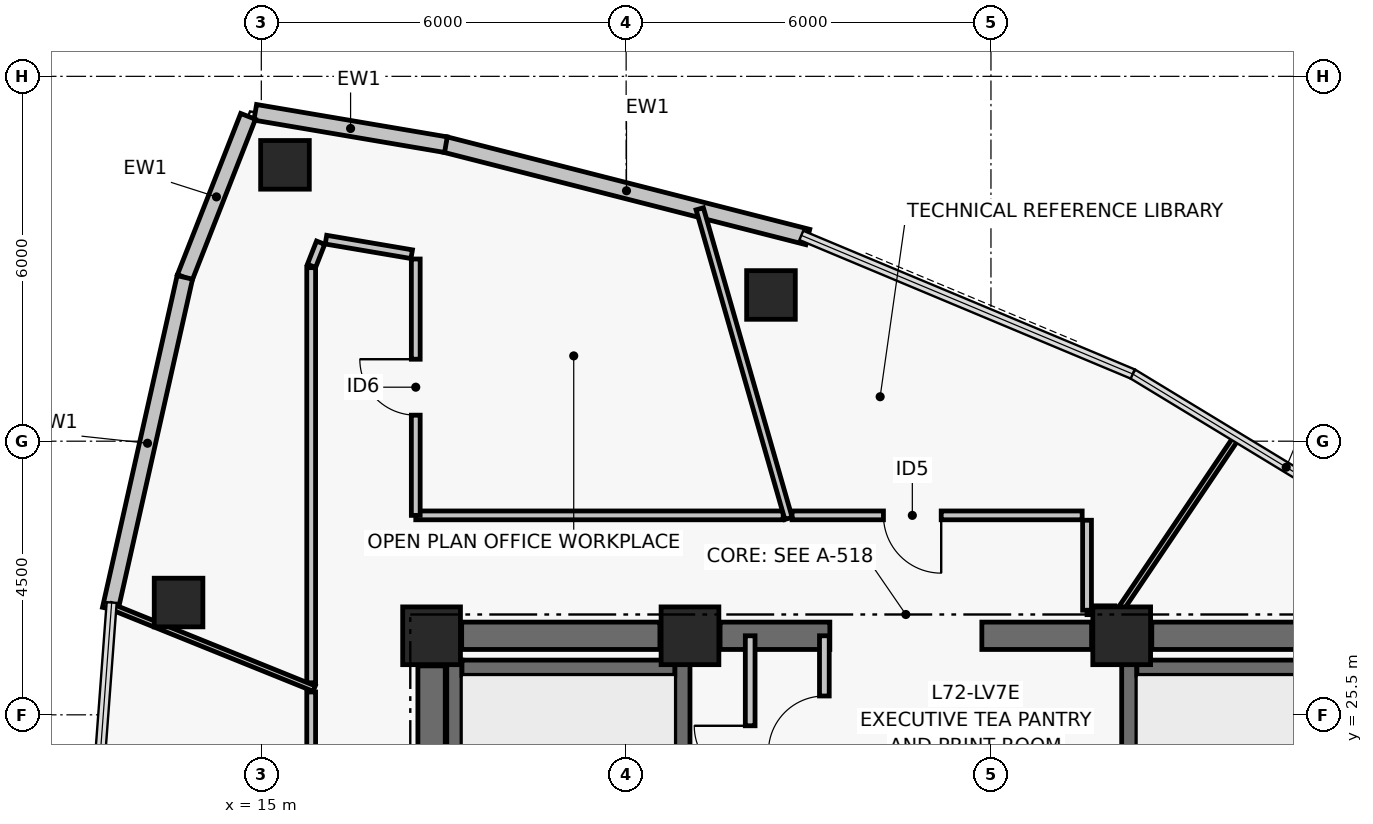
"""IFC4 building model, lengths in metres.
Left out: names, types, materials, properties, quantities, classifications, styles, units other than length and angle.
Written with IfcOpenShell. Run it as: python <this file> out.ifc"""

import sys

from ifc_helpers import new_model, si_unit, direction, frame, frame_2d, origin, origin_2d, place, context, subcontext, project, spatial, rectangle, hollow_rectangle, extrude, element, fill, save


model = new_model("IFC4")
c1 = context("Model", 3, precision=1e-05, world=origin(), true_north=direction((0.0, 1.0)))
c2 = subcontext(c1, "Body", "Model", "MODEL_VIEW")
j1 = project(units=[si_unit("LENGTHUNIT", "METRE"), si_unit("PLANEANGLEUNIT", "RADIAN")], contexts=[c1])
p1 = place(None, origin())
s1 = spatial("IfcSite", under=j1, at=p1, CompositionType="ELEMENT")
p2 = place(p1, origin())
s2 = spatial("IfcBuilding", under=s1, at=p2, CompositionType="ELEMENT")
p3 = place(p2, frame((0.0, 0.0, 284.34)))
s3 = spatial("IfcBuildingStorey", under=s2, at=p3, CompositionType="ELEMENT", Elevation=284.34)
for number, where, z_axis, x_axis in (
    (1, (17.8, 26.8, 0.0), (0.0, 0.0, 1.0), (1.0, 0.0, 0.0)),
    (2, (22.05, 26.8, 0.0), (0.0, 0.0, 1.0), (1.0, 0.0, 0.0)),
    (3, (29.15, 26.8, 0.0), (0.0, 0.0, 1.0), (1.0, 0.0, 0.0)),
):
    element("IfcColumn", number, at=place(p3, frame(where, z_axis=z_axis, x_axis=x_axis)), inside=s3, PredefinedType="COLUMN", context=c2, shape_type="SweptSolid", body=[
        extrude(rectangle(XDim=0.95, YDim=0.95, at=origin_2d()), origin(), (0.0, 0.0, 1.0), 3.72),
    ])
p4 = place(p3, frame((18.295, 26.8, 0.0), z_axis=(0.0, 0.0, 1.0), x_axis=(1.0, 0.0, 0.0)))
e4 = element("IfcWall", 4, at=p4, inside=s3, PredefinedType="SHEAR", context=c2, shape_type="SweptSolid", body=[
    extrude(rectangle(XDim=3.26, YDim=0.45, at=frame_2d((1.63, 0.0))), origin(), (0.0, 0.0, 1.0), 3.5),
])
p5 = place(p3, frame((22.545, 26.8, 0.0), z_axis=(0.0, 0.0, 1.0), x_axis=(1.0, 0.0, 0.0)))
e5 = element("IfcWall", 5, at=p5, inside=s3, PredefinedType="SHEAR", context=c2, shape_type="SweptSolid", body=[
    extrude(rectangle(XDim=1.805, YDim=0.45, at=frame_2d((0.903, 0.0))), origin(), (0.0, 0.0, 1.0), 3.5),
])
p6 = place(p3, frame((26.85, 26.8, 0.0), z_axis=(0.0, 0.0, 1.0), x_axis=(1.0, 0.0, 0.0)))
e6 = element("IfcWall", 6, at=p6, inside=s3, PredefinedType="SHEAR", context=c2, shape_type="SweptSolid", body=[
    extrude(rectangle(XDim=1.805, YDim=0.45, at=frame_2d((0.902, 0.0))), origin(), (0.0, 0.0, 1.0), 3.5),
])
p7 = place(p3, frame((29.645, 26.8, 0.0), z_axis=(0.0, 0.0, 1.0), x_axis=(1.0, 0.0, 0.0)))
e7 = element("IfcWall", 7, at=p7, inside=s3, PredefinedType="SHEAR", context=c2, shape_type="SweptSolid", body=[
    extrude(rectangle(XDim=3.26, YDim=0.45, at=frame_2d((1.63, 0.0))), origin(), (0.0, 0.0, 1.0), 3.5),
])
p8 = place(p3, frame((17.8, 17.695, 0.0), z_axis=(0.0, 0.0, 1.0), x_axis=(0.0, 1.0, 0.0)))
e8 = element("IfcWall", 8, at=p8, inside=s3, PredefinedType="SHEAR", context=c2, shape_type="SweptSolid", body=[
    extrude(rectangle(XDim=8.61, YDim=0.45, at=frame_2d((4.305, 0.0))), origin(), (0.0, 0.0, 1.0), 3.5),
])
p9 = place(p3, frame((18.175, 17.6, 0.0), z_axis=(0.0, 0.0, 1.0), x_axis=(0.0, 1.0, 0.0)))
e9 = element("IfcWall", 9, at=p9, inside=s3, PredefinedType="SHEAR", context=c2, shape_type="SweptSolid", body=[
    extrude(rectangle(XDim=8.8, YDim=0.25, at=frame_2d((4.4, 0.0))), origin(), (0.0, 0.0, 1.0), 3.5),
])
p10 = place(p3, frame((21.925, 17.6, 0.0), z_axis=(0.0, 0.0, 1.0), x_axis=(0.0, 1.0, 0.0)))
e10 = element("IfcWall", 10, at=p10, inside=s3, PredefinedType="SHEAR", context=c2, shape_type="SweptSolid", body=[
    extrude(rectangle(XDim=8.8, YDim=0.25, at=frame_2d((4.4, 0.0))), origin(), (0.0, 0.0, 1.0), 3.5),
])
p11 = place(p10, frame((0.35, 0.0, 0.0)))
e11 = element("IfcOpeningElement", 11, at=p11, cuts=e10, PredefinedType="OPENING", context=c2, shape_type="SweptSolid", body=[
    extrude(rectangle(XDim=1.05, YDim=2.08, at=frame_2d((0.525, 1.04))), frame((0.0, 0.135, 0.0), z_axis=(0.0, -1.0, 0.0), x_axis=(1.0, 0.0, 0.0)), (0.0, 0.0, 1.0), 0.27),
])
p12 = place(p3, frame((18.3, 26.275, 0.0), z_axis=(0.0, 0.0, 1.0), x_axis=(1.0, 0.0, 0.0)))
e12 = element("IfcWall", 12, at=p12, inside=s3, PredefinedType="SHEAR", context=c2, shape_type="SweptSolid", body=[
    extrude(rectangle(XDim=3.5, YDim=0.25, at=frame_2d((1.75, 0.0))), origin(), (0.0, 0.0, 1.0), 3.5),
])
p13 = place(p3, frame((29.275, 17.6, 0.0), z_axis=(0.0, 0.0, 1.0), x_axis=(0.0, 1.0, 0.0)))
e13 = element("IfcWall", 13, at=p13, inside=s3, PredefinedType="SHEAR", context=c2, shape_type="SweptSolid", body=[
    extrude(rectangle(XDim=8.8, YDim=0.25, at=frame_2d((4.4, 0.0))), origin(), (0.0, 0.0, 1.0), 3.5),
])
p14 = place(p13, frame((0.35, 0.0, 0.0)))
e14 = element("IfcOpeningElement", 14, at=p14, cuts=e13, PredefinedType="OPENING", context=c2, shape_type="SweptSolid", body=[
    extrude(rectangle(XDim=1.05, YDim=2.08, at=frame_2d((0.525, 1.04))), frame((0.0, 0.135, 0.0), z_axis=(0.0, -1.0, 0.0), x_axis=(1.0, 0.0, 0.0)), (0.0, 0.0, 1.0), 0.27),
])
p15 = place(p3, frame((29.4, 26.275, 0.0), z_axis=(0.0, 0.0, 1.0), x_axis=(1.0, 0.0, 0.0)))
e15 = element("IfcWall", 15, at=p15, inside=s3, PredefinedType="SHEAR", context=c2, shape_type="SweptSolid", body=[
    extrude(rectangle(XDim=3.5, YDim=0.25, at=frame_2d((1.75, 0.0))), origin(), (0.0, 0.0, 1.0), 3.5),
])
for number, where, z_axis, x_axis in (
    (16, (23.382, 32.405, 0.0), (0.0, 0.0, 1.0), (1.0, 0.0, 0.0)),
    (17, (15.389, 34.545, 0.0), (0.0, 0.0, 1.0), (1.0, 0.0, 0.0)),
    (18, (13.639, 27.347, 0.0), (0.0, 0.0, 1.0), (1.0, 0.0, 0.0)),
):
    element("IfcColumn", number, at=place(p3, frame(where, z_axis=z_axis, x_axis=x_axis)), inside=s3, PredefinedType="COLUMN", context=c2, shape_type="SweptSolid", body=[
        extrude(hollow_rectangle(XDim=0.8, YDim=0.8, WallThickness=0.035, at=origin_2d()), origin(), (0.0, 0.0, 1.0), 3.72),
    ])
p16 = place(p3, frame((18.024, 34.879, 0.0), z_axis=(0.0, 0.0, 1.0), x_axis=(0.968988278672, -0.247106689096, 0.0)))
e19 = element("IfcWall", 19, at=p16, inside=s3, PredefinedType="PARTITIONING", context=c2, shape_type="SweptSolid", body=[
    extrude(rectangle(XDim=6.154, YDim=0.26, at=frame_2d((3.077, 0.0))), origin(), (0.0, 0.0, 1.0), 3.5),
])
p17 = place(p3, frame((14.9, 35.409, 0.0), z_axis=(0.0, 0.0, 1.0), x_axis=(0.985889432766, -0.167397808709, 0.0)))
e20 = element("IfcWall", 20, at=p17, inside=s3, PredefinedType="PARTITIONING", context=c2, shape_type="SweptSolid", body=[
    extrude(rectangle(XDim=3.181, YDim=0.26, at=frame_2d((1.59, 0.0))), origin(), (0.0, 0.0, 1.0), 3.5),
])
p18 = place(p3, frame((13.742, 32.693, 0.0), z_axis=(0.0, 0.0, 1.0), x_axis=(0.36559927932, 0.930772349697, 0.0)))
e21 = element("IfcWall", 21, at=p18, inside=s3, PredefinedType="PARTITIONING", context=c2, shape_type="SweptSolid", body=[
    extrude(rectangle(XDim=2.845, YDim=0.26, at=frame_2d((1.423, 0.0))), origin(), (0.0, 0.0, 1.0), 3.5),
])
p19 = place(p3, frame((12.515, 27.24, 0.0), z_axis=(0.0, 0.0, 1.0), x_axis=(0.219500763731, 0.97561232809, 0.0)))
e22 = element("IfcWall", 22, at=p19, inside=s3, PredefinedType="PARTITIONING", context=c2, shape_type="SweptSolid", body=[
    extrude(rectangle(XDim=5.59, YDim=0.26, at=frame_2d((2.795, 0.0))), origin(), (0.0, 0.0, 1.0), 3.5),
])
p20 = place(p3, frame((23.04, 23.5, 0.0), z_axis=(0.0, 0.0, 1.0), x_axis=(0.0, 1.0, 0.0)))
e23 = element("IfcWall", 23, at=p20, inside=s3, PredefinedType="PARTITIONING", context=c2, shape_type="SweptSolid", body=[
    extrude(rectangle(XDim=3.3, YDim=0.16, at=frame_2d((1.65, 0.0))), origin(), (0.0, 0.0, 1.0), 2.63),
])
p21 = place(p20, frame((0.9, 0.0, 0.0)))
e24 = element("IfcOpeningElement", 24, at=p21, cuts=e23, PredefinedType="OPENING", context=c2, shape_type="SweptSolid", body=[
    extrude(rectangle(XDim=0.92, YDim=2.05, at=frame_2d((0.46, 1.025))), frame((0.0, 0.09, 0.0), z_axis=(0.0, -1.0, 0.0), x_axis=(1.0, 0.0, 0.0)), (0.0, 0.0, 1.0), 0.18),
])
p22 = place(p3, frame((24.26, 24.24, 0.0), z_axis=(0.0, 0.0, 1.0), x_axis=(0.0, 1.0, 0.0)))
e25 = element("IfcWall", 25, at=p22, inside=s3, PredefinedType="PARTITIONING", context=c2, shape_type="SweptSolid", body=[
    extrude(rectangle(XDim=2.56, YDim=0.16, at=frame_2d((1.28, 0.0))), origin(), (0.0, 0.0, 1.0), 2.63),
])
p23 = place(p22, frame((0.65, 0.0, 0.0)))
e26 = element("IfcOpeningElement", 26, at=p23, cuts=e25, PredefinedType="OPENING", context=c2, shape_type="SweptSolid", body=[
    extrude(rectangle(XDim=0.92, YDim=2.05, at=frame_2d((0.46, 1.025))), frame((0.0, 0.09, 0.0), z_axis=(0.0, -1.0, 0.0), x_axis=(1.0, 0.0, 0.0)), (0.0, 0.0, 1.0), 0.18),
])
p24 = place(p3, frame((15.82, 25.876, 0.0), z_axis=(0.0, 0.0, 1.0), x_axis=(0.0, -1.0, 0.0)))
e27 = element("IfcWall", 27, at=p24, inside=s3, PredefinedType="PARTITIONING", context=c2, shape_type="SweptSolid", body=[
    extrude(rectangle(XDim=9.442, YDim=0.145, at=frame_2d((4.721, 0.0))), origin(), (0.0, 0.0, 1.0), 2.83),
])
p25 = place(p24, frame((3.254, 0.0, 0.0)))
e28 = element("IfcOpeningElement", 28, at=p25, cuts=e27, PredefinedType="OPENING", context=c2, shape_type="SweptSolid", body=[
    extrude(rectangle(XDim=0.95, YDim=2.06, at=frame_2d((0.475, 1.03))), frame((0.0, 0.083, 0.0), z_axis=(0.0, -1.0, 0.0), x_axis=(1.0, 0.0, 0.0)), (0.0, 0.0, 1.0), 0.165),
])
p26 = place(p3, frame((29.037, 27.22, 0.0), z_axis=(0.0, 0.0, 1.0), x_axis=(-1.0, 0.0, 0.0)))
e29 = element("IfcWall", 29, at=p26, inside=s3, PredefinedType="PARTITIONING", context=c2, shape_type="SweptSolid", body=[
    extrude(rectangle(XDim=0.457, YDim=0.145, at=frame_2d((0.228, 0.0))), origin(), (0.0, 0.0, 1.0), 2.63),
])
p27 = place(p3, frame((28.58, 27.22, 0.0), z_axis=(0.0, 0.0, 1.0), x_axis=(0.0, 1.0, 0.0)))
e30 = element("IfcWall", 30, at=p27, inside=s3, PredefinedType="PARTITIONING", context=c2, shape_type="SweptSolid", body=[
    extrude(rectangle(XDim=1.48, YDim=0.145, at=frame_2d((0.74, 0.0))), origin(), (0.0, 0.0, 1.0), 2.63),
])
p28 = place(p3, frame((28.5, 28.78, 0.0), z_axis=(0.0, 0.0, 1.0), x_axis=(-1.0, 0.0, 0.0)))
e31 = element("IfcWall", 31, at=p28, inside=s3, PredefinedType="PARTITIONING", context=c2, shape_type="SweptSolid", body=[
    extrude(rectangle(XDim=4.771, YDim=0.145, at=frame_2d((2.386, 0.0))), origin(), (0.0, 0.0, 1.0), 3.5),
])
p29 = place(p28, frame((2.318, 0.0, 0.0)))
e32 = element("IfcOpeningElement", 32, at=p29, cuts=e31, PredefinedType="OPENING", context=c2, shape_type="SweptSolid", body=[
    extrude(rectangle(XDim=0.95, YDim=2.06, at=frame_2d((0.475, 1.03))), frame((0.0, 0.083, 0.0), z_axis=(0.0, -1.0, 0.0), x_axis=(1.0, 0.0, 0.0)), (0.0, 0.0, 1.0), 0.165),
])
p30 = place(p3, frame((23.583, 28.78, 0.0), z_axis=(0.0, 0.0, 1.0), x_axis=(-1.0, 0.0, 0.0)))
e33 = element("IfcWall", 33, at=p30, inside=s3, PredefinedType="PARTITIONING", context=c2, shape_type="SweptSolid", body=[
    extrude(rectangle(XDim=6.043, YDim=0.145, at=frame_2d((3.021, 0.0))), origin(), (0.0, 0.0, 1.0), 2.83),
])
p31 = place(p3, frame((17.54, 28.78, 0.0), z_axis=(0.0, 0.0, 1.0), x_axis=(0.0, 1.0, 0.0)))
e34 = element("IfcWall", 34, at=p31, inside=s3, PredefinedType="PARTITIONING", context=c2, shape_type="SweptSolid", body=[
    extrude(rectangle(XDim=4.216, YDim=0.145, at=frame_2d((2.108, 0.0))), origin(), (0.0, 0.0, 1.0), 3.13),
])
p32 = place(p31, frame((1.648, 0.0, 0.0)))
e35 = element("IfcOpeningElement", 35, at=p32, cuts=e34, PredefinedType="OPENING", context=c2, shape_type="SweptSolid", body=[
    extrude(rectangle(XDim=0.92, YDim=2.05, at=frame_2d((0.46, 1.025))), frame((0.0, 0.083, 0.0), z_axis=(0.0, -1.0, 0.0), x_axis=(1.0, 0.0, 0.0)), (0.0, 0.0, 1.0), 0.165),
])
p33 = place(p3, frame((17.473, 33.075, 0.0), z_axis=(0.0, 0.0, 1.0), x_axis=(-0.985881780308, 0.167442871621, 0.0)))
e36 = element("IfcWall", 36, at=p33, inside=s3, PredefinedType="PARTITIONING", context=c2, shape_type="SweptSolid", body=[
    extrude(rectangle(XDim=1.43, YDim=0.145, at=frame_2d((0.715, 0.0))), origin(), (0.0, 0.0, 1.0), 3.13),
])
p34 = place(p3, frame((15.975, 33.265, 0.0), z_axis=(0.0, 0.0, 1.0), x_axis=(-0.365633948196, -0.930758731319, 0.0)))
e37 = element("IfcWall", 37, at=p34, inside=s3, PredefinedType="PARTITIONING", context=c2, shape_type="SweptSolid", body=[
    extrude(rectangle(XDim=0.41, YDim=0.145, at=frame_2d((0.205, 0.0))), origin(), (0.0, 0.0, 1.0), 2.83),
])
p35 = place(p3, frame((15.82, 32.854, 0.0), z_axis=(0.0, 0.0, 1.0), x_axis=(0.0, -1.0, 0.0)))
e38 = element("IfcWall", 38, at=p35, inside=s3, PredefinedType="PARTITIONING", context=c2, shape_type="SweptSolid", body=[
    extrude(rectangle(XDim=6.827, YDim=0.145, at=frame_2d((3.414, 0.0))), origin(), (0.0, 0.0, 1.0), 2.83),
])
p36 = place(p3, frame((29.087, 27.17, 0.0), z_axis=(0.0, 0.0, 1.0), x_axis=(0.559194012427, 0.829036824554, 0.0)))
e39 = element("IfcWall", 39, at=p36, inside=s3, PredefinedType="PARTITIONING", context=c2, shape_type="SweptSolid", body=[
    extrude(rectangle(XDim=3.504, YDim=0.095, at=frame_2d((1.752, 0.0))), origin(), (0.0, 0.0, 1.0), 2.63),
])
p37 = place(p3, frame((23.67, 28.73, 0.0), z_axis=(0.0, 0.0, 1.0), x_axis=(-0.275646373744, 0.961259110044, 0.0)))
e40 = element("IfcWall", 40, at=p37, inside=s3, PredefinedType="PARTITIONING", context=c2, shape_type="SweptSolid", body=[
    extrude(rectangle(XDim=5.296, YDim=0.125, at=frame_2d((2.648, 0.0))), origin(), (0.0, 0.0, 1.0), 2.83),
])
p38 = place(p3, frame((15.87, 25.931, 0.0), z_axis=(0.0, 0.0, 1.0), x_axis=(-0.92718807063, 0.374596158123, 0.0)))
e41 = element("IfcWall", 41, at=p38, inside=s3, PredefinedType="PARTITIONING", context=c2, shape_type="SweptSolid", body=[
    extrude(rectangle(XDim=3.609, YDim=0.095, at=frame_2d((1.804, 0.0))), origin(), (0.0, 0.0, 1.0), 2.98),
])
p39 = place(p21, origin())
e42 = element("IfcDoor", 42, at=p39, inside=s3, OperationType="SINGLE_SWING_RIGHT", PredefinedType="DOOR", context=c2, shape_type="SweptSolid", body=[
    extrude(rectangle(XDim=0.92, YDim=2.05, at=frame_2d((0.46, 1.025))), frame((0.0, 0.025, 0.0), z_axis=(0.0, -1.0, 0.0), x_axis=(1.0, 0.0, 0.0)), (0.0, 0.0, 1.0), 0.05),
])
fill(e24, e42)
p40 = place(p23, origin())
e43 = element("IfcDoor", 43, at=p40, inside=s3, OperationType="SINGLE_SWING_LEFT", PredefinedType="DOOR", context=c2, shape_type="SweptSolid", body=[
    extrude(rectangle(XDim=0.92, YDim=2.05, at=frame_2d((0.46, 1.025))), frame((0.0, 0.025, 0.0), z_axis=(0.0, -1.0, 0.0), x_axis=(1.0, 0.0, 0.0)), (0.0, 0.0, 1.0), 0.05),
])
fill(e26, e43)
p41 = place(p29, origin())
e44 = element("IfcDoor", 44, at=p41, inside=s3, OperationType="SINGLE_SWING_LEFT", PredefinedType="DOOR", context=c2, shape_type="SweptSolid", body=[
    extrude(rectangle(XDim=0.95, YDim=2.06, at=frame_2d((0.475, 1.03))), frame((0.0, 0.025, 0.0), z_axis=(0.0, -1.0, 0.0), x_axis=(1.0, 0.0, 0.0)), (0.0, 0.0, 1.0), 0.05),
])
fill(e32, e44)
p42 = place(p32, origin())
e45 = element("IfcDoor", 45, at=p42, inside=s3, OperationType="SINGLE_SWING_RIGHT", PredefinedType="DOOR", context=c2, shape_type="SweptSolid", body=[
    extrude(rectangle(XDim=0.92, YDim=2.05, at=frame_2d((0.46, 1.025))), frame((0.0, 0.025, 0.0), z_axis=(0.0, -1.0, 0.0), x_axis=(1.0, 0.0, 0.0)), (0.0, 0.0, 1.0), 0.05),
])
fill(e35, e45)
save(model, sys.argv[1])
